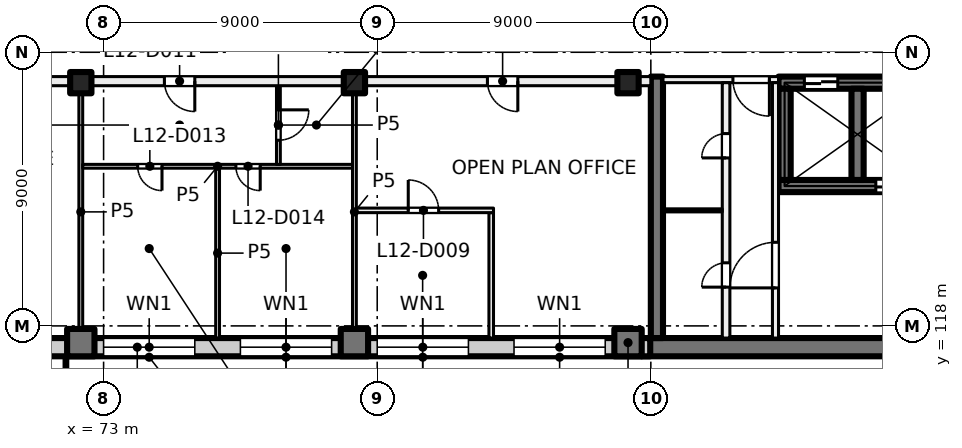
"""IFC4 building model, lengths in metres.
Left out: names, types, materials, properties, quantities, classifications, styles, units other than length and angle.
Written with IfcOpenShell. Run it as: python <this file> out.ifc"""

import sys

from ifc_helpers import new_model, si_unit, direction, frame, frame_2d, origin, origin_2d, place, context, subcontext, project, spatial, rectangle, extrude, element, fill, save


model = new_model("IFC4")
c1 = context("Model", 3, precision=1e-05, world=origin(), true_north=direction((0.0, 1.0)))
c2 = subcontext(c1, "Body", "Model", "MODEL_VIEW")
j1 = project(units=[si_unit("LENGTHUNIT", "METRE"), si_unit("PLANEANGLEUNIT", "RADIAN")], contexts=[c1])
p1 = place(None, origin())
s1 = spatial("IfcSite", under=j1, at=p1, CompositionType="ELEMENT")
p2 = place(p1, origin())
s2 = spatial("IfcBuilding", under=s1, at=p2, CompositionType="ELEMENT")
p3 = place(p2, frame((0.0, 0.0, 55.5)))
s3 = spatial("IfcBuildingStorey", under=s2, at=p3, CompositionType="ELEMENT", Elevation=55.5)
for number, where, z_axis, x_axis in (
    (1, (72.25, 126.0, 0.0), (0.0, 0.0, 1.0), (1.0, 0.0, 0.0)),
    (2, (81.25, 126.0, 0.0), (0.0, 0.0, 1.0), (1.0, 0.0, 0.0)),
    (3, (90.25, 126.0, 0.0), (0.0, 0.0, 1.0), (1.0, 0.0, 0.0)),
):
    element("IfcColumn", number, at=place(p3, frame(where, z_axis=z_axis, x_axis=x_axis)), inside=s3, PredefinedType="COLUMN", context=c2, shape_type="SweptSolid", body=[
        extrude(rectangle(XDim=0.7, YDim=0.7, at=origin_2d()), origin(), (0.0, 0.0, 1.0), 4.0),
    ])
for number, where, z_axis, x_axis in (
    (4, (72.25, 117.45, 0.0), (0.0, 0.0, 1.0), (1.0, 0.0, 0.0)),
    (5, (81.25, 117.45, 0.0), (0.0, 0.0, 1.0), (1.0, 0.0, 0.0)),
    (6, (90.25, 117.45, 0.0), (0.0, 0.0, 1.0), (1.0, 0.0, 0.0)),
):
    element("IfcColumn", number, at=place(p3, frame(where, z_axis=z_axis, x_axis=x_axis)), inside=s3, PredefinedType="COLUMN", context=c2, shape_type="SweptSolid", body=[
        extrude(rectangle(XDim=0.9, YDim=0.9, at=origin_2d()), origin(), (0.0, 0.0, 1.0), 4.0),
    ])
p4 = place(p3, frame((99.6, 117.3, 0.0), z_axis=(0.0, 0.0, 1.0), x_axis=(-1.0, 0.0, 0.0)))
e7 = element("IfcWall", 7, at=p4, inside=s3, PredefinedType="SHEAR", context=c2, shape_type="SweptSolid", body=[
    extrude(rectangle(XDim=8.9, YDim=0.6, at=frame_2d((4.45, 0.0))), origin(), (0.0, 0.0, 1.0), 4.0),
])
p5 = place(p3, frame((107.4, 126.0, 0.0), z_axis=(0.0, 0.0, 1.0), x_axis=(-1.0, 0.0, 0.0)))
e8 = element("IfcWall", 8, at=p5, inside=s3, PredefinedType="SHEAR", context=c2, shape_type="SweptSolid", body=[
    extrude(rectangle(XDim=12.2, YDim=0.4, at=frame_2d((6.1, 0.0))), origin(), (0.0, 0.0, 1.0), 4.0),
])
p6 = place(p5, frame((10.25, 0.0, 0.0)))
e9 = element("IfcOpeningElement", 9, at=p6, cuts=e8, PredefinedType="OPENING", context=c2, shape_type="SweptSolid", body=[
    extrude(rectangle(XDim=1.1, YDim=2.1, at=frame_2d((0.55, 1.05))), frame((0.0, 0.21, 0.0), z_axis=(0.0, -1.0, 0.0), x_axis=(1.0, 0.0, 0.0)), (0.0, 0.0, 1.0), 0.42),
])
p7 = place(p5, frame((0.7, 0.0, 0.0)))
e10 = element("IfcOpeningElement", 10, at=p7, cuts=e8, PredefinedType="OPENING", context=c2, shape_type="SweptSolid", body=[
    extrude(rectangle(XDim=0.8, YDim=2.1, at=frame_2d((0.4, 1.05))), frame((0.0, 0.21, 0.0), z_axis=(0.0, -1.0, 0.0), x_axis=(1.0, 0.0, 0.0)), (0.0, 0.0, 1.0), 0.42),
])
p8 = place(p3, frame((107.4, 122.6, 0.0), z_axis=(0.0, 0.0, 1.0), x_axis=(-1.0, 0.0, 0.0)))
e11 = element("IfcWall", 11, at=p8, inside=s3, PredefinedType="SHEAR", context=c2, shape_type="SweptSolid", body=[
    extrude(rectangle(XDim=12.2, YDim=0.4, at=frame_2d((6.1, 0.0))), origin(), (0.0, 0.0, 1.0), 4.0),
])
p9 = place(p8, frame((7.9, 0.0, 0.0)))
e12 = element("IfcOpeningElement", 12, at=p9, cuts=e11, PredefinedType="OPENING", context=c2, shape_type="SweptSolid", body=[
    extrude(rectangle(XDim=1.1, YDim=2.1, at=frame_2d((0.55, 1.05))), frame((0.0, 0.21, 0.0), z_axis=(0.0, -1.0, 0.0), x_axis=(1.0, 0.0, 0.0)), (0.0, 0.0, 1.0), 0.42),
])
for number, where, z_axis, x_axis in (
    (13, (97.8, 125.8, 0.0), (0.0, 0.0, 1.0), (0.0, -1.0, 0.0)),
    (14, (95.4, 125.8, 0.0), (0.0, 0.0, 1.0), (0.0, -1.0, 0.0)),
):
    element("IfcWall", number, at=place(p3, frame(where, z_axis=z_axis, x_axis=x_axis)), inside=s3, PredefinedType="SHEAR", context=c2, shape_type="SweptSolid", body=[
        extrude(rectangle(XDim=3.0, YDim=0.4, at=frame_2d((1.5, 0.0))), origin(), (0.0, 0.0, 1.0), 4.0),
    ])
p10 = place(p3, frame((91.2, 126.2, 0.0), z_axis=(0.0, 0.0, 1.0), x_axis=(0.0, -1.0, 0.0)))
e15 = element("IfcWall", 15, at=p10, inside=s3, PredefinedType="SHEAR", context=c2, shape_type="SweptSolid", body=[
    extrude(rectangle(XDim=8.6, YDim=0.4, at=frame_2d((4.3, 0.0))), origin(), (0.0, 0.0, 1.0), 4.0),
])
p11 = place(p3, frame((90.98, 117.3, 0.0), z_axis=(0.0, 0.0, 1.0), x_axis=(-1.0, 0.0, 0.0)))
e16 = element("IfcWall", 16, at=p11, inside=s3, PredefinedType="SOLIDWALL", context=c2, shape_type="SweptSolid", body=[
    extrude(rectangle(XDim=33.745, YDim=0.6, at=frame_2d((16.873, 0.0))), origin(), (0.0, 0.0, 1.0), 3.625),
])
p12 = place(p11, frame((1.48, 0.0, 0.9)))
e17 = element("IfcOpeningElement", 17, at=p12, cuts=e16, PredefinedType="OPENING", context=c2, shape_type="SweptSolid", body=[
    extrude(rectangle(XDim=3.0, YDim=2.4, at=frame_2d((1.5, 1.2))), frame((0.0, 0.31, 0.0), z_axis=(0.0, -1.0, 0.0), x_axis=(1.0, 0.0, 0.0)), (0.0, 0.0, 1.0), 0.62),
])
p13 = place(p11, frame((5.98, 0.0, 0.9)))
e18 = element("IfcOpeningElement", 18, at=p13, cuts=e16, PredefinedType="OPENING", context=c2, shape_type="SweptSolid", body=[
    extrude(rectangle(XDim=3.0, YDim=2.4, at=frame_2d((1.5, 1.2))), frame((0.0, 0.31, 0.0), z_axis=(0.0, -1.0, 0.0), x_axis=(1.0, 0.0, 0.0)), (0.0, 0.0, 1.0), 0.62),
])
p14 = place(p11, frame((10.48, 0.0, 0.9)))
e19 = element("IfcOpeningElement", 19, at=p14, cuts=e16, PredefinedType="OPENING", context=c2, shape_type="SweptSolid", body=[
    extrude(rectangle(XDim=3.0, YDim=2.4, at=frame_2d((1.5, 1.2))), frame((0.0, 0.31, 0.0), z_axis=(0.0, -1.0, 0.0), x_axis=(1.0, 0.0, 0.0)), (0.0, 0.0, 1.0), 0.62),
])
p15 = place(p11, frame((14.98, 0.0, 0.9)))
e20 = element("IfcOpeningElement", 20, at=p15, cuts=e16, PredefinedType="OPENING", context=c2, shape_type="SweptSolid", body=[
    extrude(rectangle(XDim=3.0, YDim=2.4, at=frame_2d((1.5, 1.2))), frame((0.0, 0.31, 0.0), z_axis=(0.0, -1.0, 0.0), x_axis=(1.0, 0.0, 0.0)), (0.0, 0.0, 1.0), 0.62),
])
p16 = place(p11, frame((20.08, 0.0, 0.0)))
e21 = element("IfcOpeningElement", 21, at=p16, cuts=e16, PredefinedType="OPENING", context=c2, shape_type="SweptSolid", body=[
    extrude(rectangle(XDim=1.8, YDim=2.4, at=frame_2d((0.9, 1.2))), frame((0.0, 0.31, 0.0), z_axis=(0.0, -1.0, 0.0), x_axis=(1.0, 0.0, 0.0)), (0.0, 0.0, 1.0), 0.62),
])
p17 = place(p11, frame((23.98, 0.0, 0.9)))
e22 = element("IfcOpeningElement", 22, at=p17, cuts=e16, PredefinedType="OPENING", context=c2, shape_type="SweptSolid", body=[
    extrude(rectangle(XDim=3.0, YDim=2.4, at=frame_2d((1.5, 1.2))), frame((0.0, 0.31, 0.0), z_axis=(0.0, -1.0, 0.0), x_axis=(1.0, 0.0, 0.0)), (0.0, 0.0, 1.0), 0.62),
])
p18 = place(p11, frame((28.48, 0.0, 0.9)))
e23 = element("IfcOpeningElement", 23, at=p18, cuts=e16, PredefinedType="OPENING", context=c2, shape_type="SweptSolid", body=[
    extrude(rectangle(XDim=3.0, YDim=2.4, at=frame_2d((1.5, 1.2))), frame((0.0, 0.31, 0.0), z_axis=(0.0, -1.0, 0.0), x_axis=(1.0, 0.0, 0.0)), (0.0, 0.0, 1.0), 0.62),
])
p19 = place(p3, frame((95.2, 126.1, 0.0), z_axis=(0.0, 0.0, 1.0), x_axis=(-1.0, 0.0, 0.0)))
e24 = element("IfcWall", 24, at=p19, inside=s3, PredefinedType="PARTITIONING", context=c2, shape_type="SweptSolid", body=[
    extrude(rectangle(XDim=3.8, YDim=0.2, at=frame_2d((1.9, 0.0))), origin(), (0.0, 0.0, 1.0), 3.625),
])
p20 = place(p19, frame((0.3, 0.0, 0.0)))
e25 = element("IfcOpeningElement", 25, at=p20, cuts=e24, PredefinedType="OPENING", context=c2, shape_type="SweptSolid", body=[
    extrude(rectangle(XDim=1.2, YDim=2.1, at=frame_2d((0.6, 1.05))), frame((0.0, 0.11, 0.0), z_axis=(0.0, -1.0, 0.0), x_axis=(1.0, 0.0, 0.0)), (0.0, 0.0, 1.0), 0.22),
])
p21 = place(p3, frame((95.1, 117.6, 0.0), z_axis=(0.0, 0.0, 1.0), x_axis=(0.0, 1.0, 0.0)))
e26 = element("IfcWall", 26, at=p21, inside=s3, PredefinedType="PARTITIONING", context=c2, shape_type="SweptSolid", body=[
    extrude(rectangle(XDim=8.4, YDim=0.2, at=frame_2d((4.2, 0.0))), origin(), (0.0, 0.0, 1.0), 3.625),
])
p22 = place(p21, frame((1.65, 0.0, 0.0)))
e27 = element("IfcOpeningElement", 27, at=p22, cuts=e26, PredefinedType="OPENING", context=c2, shape_type="SweptSolid", body=[
    extrude(rectangle(XDim=1.5, YDim=2.1, at=frame_2d((0.75, 1.05))), frame((0.0, 0.11, 0.0), z_axis=(0.0, -1.0, 0.0), x_axis=(1.0, 0.0, 0.0)), (0.0, 0.0, 1.0), 0.22),
])
p23 = place(p3, frame((93.475, 117.6, 0.0), z_axis=(0.0, 0.0, 1.0), x_axis=(0.0, 1.0, 0.0)))
e28 = element("IfcWall", 28, at=p23, inside=s3, PredefinedType="PARTITIONING", context=c2, shape_type="SweptSolid", body=[
    extrude(rectangle(XDim=8.4, YDim=0.25, at=frame_2d((4.2, 0.0))), origin(), (0.0, 0.0, 1.0), 3.625),
])
p24 = place(p23, frame((5.925, 0.0, 0.0)))
e29 = element("IfcOpeningElement", 29, at=p24, cuts=e28, PredefinedType="OPENING", context=c2, shape_type="SweptSolid", body=[
    extrude(rectangle(XDim=0.8, YDim=2.1, at=frame_2d((0.4, 1.05))), frame((0.0, 0.135, 0.0), z_axis=(0.0, -1.0, 0.0), x_axis=(1.0, 0.0, 0.0)), (0.0, 0.0, 1.0), 0.27),
])
p25 = place(p23, frame((1.675, 0.0, 0.0)))
e30 = element("IfcOpeningElement", 30, at=p25, cuts=e28, PredefinedType="OPENING", context=c2, shape_type="SweptSolid", body=[
    extrude(rectangle(XDim=0.8, YDim=2.1, at=frame_2d((0.4, 1.05))), frame((0.0, 0.135, 0.0), z_axis=(0.0, -1.0, 0.0), x_axis=(1.0, 0.0, 0.0)), (0.0, 0.0, 1.0), 0.27),
])
p26 = place(p3, frame((93.35, 121.8, 0.0), z_axis=(0.0, 0.0, 1.0), x_axis=(-1.0, 0.0, 0.0)))
e31 = element("IfcWall", 31, at=p26, inside=s3, PredefinedType="PARTITIONING", context=c2, shape_type="SweptSolid", body=[
    extrude(rectangle(XDim=1.95, YDim=0.1, at=frame_2d((0.975, 0.0))), origin(), (0.0, 0.0, 1.0), 3.625),
])
p27 = place(p3, frame((72.25, 117.6, 0.0), z_axis=(0.0, 0.0, 1.0), x_axis=(0.0, 1.0, 0.0)))
e32 = element("IfcWall", 32, at=p27, inside=s3, PredefinedType="PARTITIONING", context=c2, shape_type="SweptSolid", body=[
    extrude(rectangle(XDim=8.3, YDim=0.125, at=frame_2d((4.15, 0.0))), origin(), (0.0, 0.0, 1.0), 3.625),
])
p28 = place(p3, frame((81.188, 123.25, 0.0), z_axis=(0.0, 0.0, 1.0), x_axis=(-1.0, 0.0, 0.0)))
e33 = element("IfcWall", 33, at=p28, inside=s3, PredefinedType="PARTITIONING", context=c2, shape_type="SweptSolid", body=[
    extrude(rectangle(XDim=8.876, YDim=0.125, at=frame_2d((4.438, 0.0))), origin(), (0.0, 0.0, 1.0), 3.625),
])
p29 = place(p28, frame((6.267, 0.0, 0.0)))
e34 = element("IfcOpeningElement", 34, at=p29, cuts=e33, PredefinedType="OPENING", context=c2, shape_type="SweptSolid", body=[
    extrude(rectangle(XDim=0.8, YDim=2.1, at=frame_2d((0.4, 1.05))), frame((0.0, 0.073, 0.0), z_axis=(0.0, -1.0, 0.0), x_axis=(1.0, 0.0, 0.0)), (0.0, 0.0, 1.0), 0.145),
])
p30 = place(p28, frame((3.037, 0.0, 0.0)))
e35 = element("IfcOpeningElement", 35, at=p30, cuts=e33, PredefinedType="OPENING", context=c2, shape_type="SweptSolid", body=[
    extrude(rectangle(XDim=0.8, YDim=2.1, at=frame_2d((0.4, 1.05))), frame((0.0, 0.073, 0.0), z_axis=(0.0, -1.0, 0.0), x_axis=(1.0, 0.0, 0.0)), (0.0, 0.0, 1.0), 0.145),
])
p31 = place(p3, frame((76.75, 117.6, 0.0), z_axis=(0.0, 0.0, 1.0), x_axis=(0.0, 1.0, 0.0)))
e36 = element("IfcWall", 36, at=p31, inside=s3, PredefinedType="PARTITIONING", context=c2, shape_type="SweptSolid", body=[
    extrude(rectangle(XDim=5.588, YDim=0.125, at=frame_2d((2.794, 0.0))), origin(), (0.0, 0.0, 1.0), 3.625),
])
p32 = place(p3, frame((78.75, 125.9, 0.0), z_axis=(0.0, 0.0, 1.0), x_axis=(0.0, -1.0, 0.0)))
e37 = element("IfcWall", 37, at=p32, inside=s3, PredefinedType="PARTITIONING", context=c2, shape_type="SweptSolid", body=[
    extrude(rectangle(XDim=2.588, YDim=0.125, at=frame_2d((1.294, 0.0))), origin(), (0.0, 0.0, 1.0), 3.625),
])
p33 = place(p32, frame((0.794, 0.0, 0.0)))
e38 = element("IfcOpeningElement", 38, at=p33, cuts=e37, PredefinedType="OPENING", context=c2, shape_type="SweptSolid", body=[
    extrude(rectangle(XDim=1.0, YDim=2.1, at=frame_2d((0.5, 1.05))), frame((0.0, 0.073, 0.0), z_axis=(0.0, -1.0, 0.0), x_axis=(1.0, 0.0, 0.0)), (0.0, 0.0, 1.0), 0.145),
])
p34 = place(p3, frame((81.25, 117.6, 0.0), z_axis=(0.0, 0.0, 1.0), x_axis=(0.0, 1.0, 0.0)))
e39 = element("IfcWall", 39, at=p34, inside=s3, PredefinedType="PARTITIONING", context=c2, shape_type="SweptSolid", body=[
    extrude(rectangle(XDim=8.3, YDim=0.125, at=frame_2d((4.15, 0.0))), origin(), (0.0, 0.0, 1.0), 3.625),
])
p35 = place(p3, frame((85.75, 117.6, 0.0), z_axis=(0.0, 0.0, 1.0), x_axis=(0.0, 1.0, 0.0)))
e40 = element("IfcWall", 40, at=p35, inside=s3, PredefinedType="PARTITIONING", context=c2, shape_type="SweptSolid", body=[
    extrude(rectangle(XDim=4.125, YDim=0.15, at=frame_2d((2.062, 0.0))), origin(), (0.0, 0.0, 1.0), 3.625),
])
p36 = place(p3, frame((81.312, 121.8, 0.0), z_axis=(0.0, 0.0, 1.0), x_axis=(1.0, 0.0, 0.0)))
e41 = element("IfcWall", 41, at=p36, inside=s3, PredefinedType="PARTITIONING", context=c2, shape_type="SweptSolid", body=[
    extrude(rectangle(XDim=4.513, YDim=0.15, at=frame_2d((2.256, 0.0))), origin(), (0.0, 0.0, 1.0), 3.625),
])
p37 = place(p36, frame((1.709, 0.0, 0.0)))
e42 = element("IfcOpeningElement", 42, at=p37, cuts=e41, PredefinedType="OPENING", context=c2, shape_type="SweptSolid", body=[
    extrude(rectangle(XDim=1.0, YDim=2.1, at=frame_2d((0.5, 1.05))), frame((0.0, 0.085, 0.0), z_axis=(0.0, -1.0, 0.0), x_axis=(1.0, 0.0, 0.0)), (0.0, 0.0, 1.0), 0.17),
])
p38 = place(p3, frame((91.0, 126.05, 0.0), z_axis=(0.0, 0.0, 1.0), x_axis=(-1.0, 0.0, 0.0)))
e43 = element("IfcWall", 43, at=p38, inside=s3, PredefinedType="PARTITIONING", context=c2, shape_type="SweptSolid", body=[
    extrude(rectangle(XDim=43.785, YDim=0.3, at=frame_2d((21.893, 0.0))), origin(), (0.0, 0.0, 1.0), 3.625),
])
p39 = place(p38, frame((4.375, 0.0, 0.0)))
e44 = element("IfcOpeningElement", 44, at=p39, cuts=e43, PredefinedType="OPENING", context=c2, shape_type="SweptSolid", body=[
    extrude(rectangle(XDim=1.0, YDim=2.1, at=frame_2d((0.5, 1.05))), frame((0.0, 0.16, 0.0), z_axis=(0.0, -1.0, 0.0), x_axis=(1.0, 0.0, 0.0)), (0.0, 0.0, 1.0), 0.32),
])
p40 = place(p38, frame((15.0, 0.0, 0.0)))
e45 = element("IfcOpeningElement", 45, at=p40, cuts=e43, PredefinedType="OPENING", context=c2, shape_type="SweptSolid", body=[
    extrude(rectangle(XDim=1.0, YDim=2.1, at=frame_2d((0.5, 1.05))), frame((0.0, 0.16, 0.0), z_axis=(0.0, -1.0, 0.0), x_axis=(1.0, 0.0, 0.0)), (0.0, 0.0, 1.0), 0.32),
])
p41 = place(p38, frame((34.0, 0.0, 0.0)))
e46 = element("IfcOpeningElement", 46, at=p41, cuts=e43, PredefinedType="OPENING", context=c2, shape_type="SweptSolid", body=[
    extrude(rectangle(XDim=1.0, YDim=2.1, at=frame_2d((0.5, 1.05))), frame((0.0, 0.16, 0.0), z_axis=(0.0, -1.0, 0.0), x_axis=(1.0, 0.0, 0.0)), (0.0, 0.0, 1.0), 0.32),
])
p42 = place(p38, frame((39.296, 0.0, 0.0)))
e47 = element("IfcOpeningElement", 47, at=p42, cuts=e43, PredefinedType="OPENING", context=c2, shape_type="SweptSolid", body=[
    extrude(rectangle(XDim=1.8, YDim=2.1, at=frame_2d((0.9, 1.05))), frame((0.0, 0.16, 0.0), z_axis=(0.0, -1.0, 0.0), x_axis=(1.0, 0.0, 0.0)), (0.0, 0.0, 1.0), 0.32),
])
p43 = place(p12, origin())
e48 = element("IfcWindow", 48, at=p43, inside=s3, PartitioningType="SINGLE_PANEL", PredefinedType="WINDOW", context=c2, shape_type="SweptSolid", body=[
    extrude(rectangle(XDim=3.0, YDim=2.4, at=frame_2d((1.5, 1.2))), frame((0.0, 0.03, 0.0), z_axis=(0.0, -1.0, 0.0), x_axis=(1.0, 0.0, 0.0)), (0.0, 0.0, 1.0), 0.06),
])
fill(e17, e48)
p44 = place(p13, origin())
e49 = element("IfcWindow", 49, at=p44, inside=s3, PartitioningType="SINGLE_PANEL", PredefinedType="WINDOW", context=c2, shape_type="SweptSolid", body=[
    extrude(rectangle(XDim=3.0, YDim=2.4, at=frame_2d((1.5, 1.2))), frame((0.0, 0.03, 0.0), z_axis=(0.0, -1.0, 0.0), x_axis=(1.0, 0.0, 0.0)), (0.0, 0.0, 1.0), 0.06),
])
fill(e18, e49)
p45 = place(p14, origin())
e50 = element("IfcWindow", 50, at=p45, inside=s3, PartitioningType="SINGLE_PANEL", PredefinedType="WINDOW", context=c2, shape_type="SweptSolid", body=[
    extrude(rectangle(XDim=3.0, YDim=2.4, at=frame_2d((1.5, 1.2))), frame((0.0, 0.03, 0.0), z_axis=(0.0, -1.0, 0.0), x_axis=(1.0, 0.0, 0.0)), (0.0, 0.0, 1.0), 0.06),
])
fill(e19, e50)
p46 = place(p15, origin())
e51 = element("IfcWindow", 51, at=p46, inside=s3, PartitioningType="SINGLE_PANEL", PredefinedType="WINDOW", context=c2, shape_type="SweptSolid", body=[
    extrude(rectangle(XDim=3.0, YDim=2.4, at=frame_2d((1.5, 1.2))), frame((0.0, 0.03, 0.0), z_axis=(0.0, -1.0, 0.0), x_axis=(1.0, 0.0, 0.0)), (0.0, 0.0, 1.0), 0.06),
])
fill(e20, e51)
p47 = place(p6, origin())
e52 = element("IfcDoor", 52, at=p47, inside=s3, OperationType="DOUBLE_DOOR_SLIDING", PredefinedType="DOOR", context=c2, shape_type="SweptSolid", body=[
    extrude(rectangle(XDim=1.1, YDim=2.1, at=frame_2d((0.55, 1.05))), frame((0.0, 0.025, 0.0), z_axis=(0.0, -1.0, 0.0), x_axis=(1.0, 0.0, 0.0)), (0.0, 0.0, 1.0), 0.05),
])
fill(e9, e52)
p48 = place(p20, origin())
e53 = element("IfcDoor", 53, at=p48, inside=s3, OperationType="DOUBLE_DOOR_SINGLE_SWING", PredefinedType="DOOR", context=c2, shape_type="SweptSolid", body=[
    extrude(rectangle(XDim=1.2, YDim=2.1, at=frame_2d((0.6, 1.05))), frame((0.0, 0.025, 0.0), z_axis=(0.0, -1.0, 0.0), x_axis=(1.0, 0.0, 0.0)), (0.0, 0.0, 1.0), 0.05),
])
fill(e25, e53)
p49 = place(p22, origin())
e54 = element("IfcDoor", 54, at=p49, inside=s3, OperationType="DOUBLE_DOOR_SINGLE_SWING", PredefinedType="DOOR", context=c2, shape_type="SweptSolid", body=[
    extrude(rectangle(XDim=1.5, YDim=2.1, at=frame_2d((0.75, 1.05))), frame((0.0, 0.025, 0.0), z_axis=(0.0, -1.0, 0.0), x_axis=(1.0, 0.0, 0.0)), (0.0, 0.0, 1.0), 0.05),
])
fill(e27, e54)
p50 = place(p24, origin())
e55 = element("IfcDoor", 55, at=p50, inside=s3, OperationType="SINGLE_SWING_LEFT", PredefinedType="DOOR", context=c2, shape_type="SweptSolid", body=[
    extrude(rectangle(XDim=0.8, YDim=2.1, at=frame_2d((0.4, 1.05))), frame((0.0, 0.025, 0.0), z_axis=(0.0, -1.0, 0.0), x_axis=(1.0, 0.0, 0.0)), (0.0, 0.0, 1.0), 0.05),
])
fill(e29, e55)
p51 = place(p25, origin())
e56 = element("IfcDoor", 56, at=p51, inside=s3, OperationType="SINGLE_SWING_RIGHT", PredefinedType="DOOR", context=c2, shape_type="SweptSolid", body=[
    extrude(rectangle(XDim=0.8, YDim=2.1, at=frame_2d((0.4, 1.05))), frame((0.0, 0.025, 0.0), z_axis=(0.0, -1.0, 0.0), x_axis=(1.0, 0.0, 0.0)), (0.0, 0.0, 1.0), 0.05),
])
fill(e30, e56)
p52 = place(p9, origin())
e57 = element("IfcDoor", 57, at=p52, inside=s3, OperationType="DOUBLE_DOOR_SLIDING", PredefinedType="DOOR", context=c2, shape_type="SweptSolid", body=[
    extrude(rectangle(XDim=1.1, YDim=2.1, at=frame_2d((0.55, 1.05))), frame((0.0, 0.025, 0.0), z_axis=(0.0, -1.0, 0.0), x_axis=(1.0, 0.0, 0.0)), (0.0, 0.0, 1.0), 0.05),
])
fill(e12, e57)
p53 = place(p37, origin())
e58 = element("IfcDoor", 58, at=p53, inside=s3, OperationType="SINGLE_SWING_LEFT", PredefinedType="DOOR", context=c2, shape_type="SweptSolid", body=[
    extrude(rectangle(XDim=1.0, YDim=2.1, at=frame_2d((0.5, 1.05))), frame((0.0, 0.025, 0.0), z_axis=(0.0, -1.0, 0.0), x_axis=(1.0, 0.0, 0.0)), (0.0, 0.0, 1.0), 0.05),
])
fill(e42, e58)
p54 = place(p39, origin())
e59 = element("IfcDoor", 59, at=p54, inside=s3, OperationType="SINGLE_SWING_LEFT", PredefinedType="DOOR", context=c2, shape_type="SweptSolid", body=[
    extrude(rectangle(XDim=1.0, YDim=2.1, at=frame_2d((0.5, 1.05))), frame((0.0, 0.025, 0.0), z_axis=(0.0, -1.0, 0.0), x_axis=(1.0, 0.0, 0.0)), (0.0, 0.0, 1.0), 0.05),
])
fill(e44, e59)
p55 = place(p40, origin())
e60 = element("IfcDoor", 60, at=p55, inside=s3, OperationType="SINGLE_SWING_LEFT", PredefinedType="DOOR", context=c2, shape_type="SweptSolid", body=[
    extrude(rectangle(XDim=1.0, YDim=2.1, at=frame_2d((0.5, 1.05))), frame((0.0, 0.025, 0.0), z_axis=(0.0, -1.0, 0.0), x_axis=(1.0, 0.0, 0.0)), (0.0, 0.0, 1.0), 0.05),
])
fill(e45, e60)
p56 = place(p33, origin())
e61 = element("IfcDoor", 61, at=p56, inside=s3, OperationType="SINGLE_SWING_RIGHT", PredefinedType="DOOR", context=c2, shape_type="SweptSolid", body=[
    extrude(rectangle(XDim=1.0, YDim=2.1, at=frame_2d((0.5, 1.05))), frame((0.0, 0.025, 0.0), z_axis=(0.0, -1.0, 0.0), x_axis=(1.0, 0.0, 0.0)), (0.0, 0.0, 1.0), 0.05),
])
fill(e38, e61)
p57 = place(p29, origin())
e62 = element("IfcDoor", 62, at=p57, inside=s3, OperationType="SINGLE_SWING_RIGHT", PredefinedType="DOOR", context=c2, shape_type="SweptSolid", body=[
    extrude(rectangle(XDim=0.8, YDim=2.1, at=frame_2d((0.4, 1.05))), frame((0.0, 0.025, 0.0), z_axis=(0.0, -1.0, 0.0), x_axis=(1.0, 0.0, 0.0)), (0.0, 0.0, 1.0), 0.05),
])
fill(e34, e62)
p58 = place(p30, origin())
e63 = element("IfcDoor", 63, at=p58, inside=s3, OperationType="SINGLE_SWING_LEFT", PredefinedType="DOOR", context=c2, shape_type="SweptSolid", body=[
    extrude(rectangle(XDim=0.8, YDim=2.1, at=frame_2d((0.4, 1.05))), frame((0.0, 0.025, 0.0), z_axis=(0.0, -1.0, 0.0), x_axis=(1.0, 0.0, 0.0)), (0.0, 0.0, 1.0), 0.05),
])
fill(e35, e63)
save(model, sys.argv[1])
